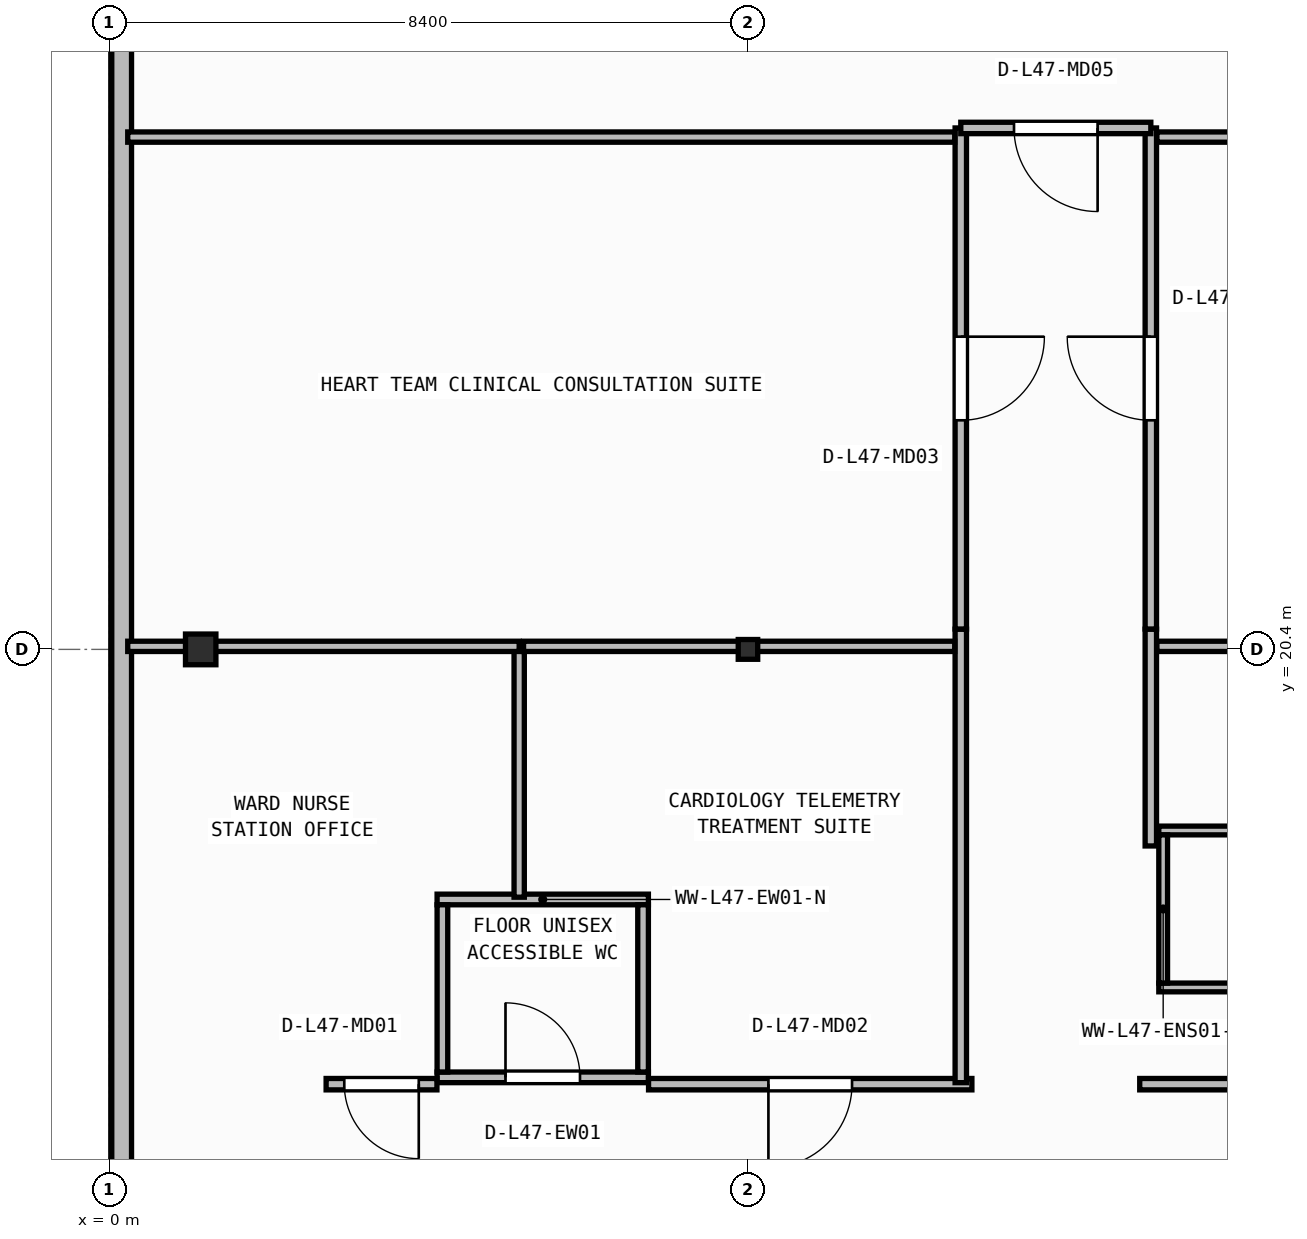
"""IFC4 building model, lengths in metres.
Left out: names, types, materials, properties, quantities, classifications, styles, units other than length and angle.
Written with IfcOpenShell. Run it as: python <this file> out.ifc"""

import sys

from ifc_helpers import new_model, si_unit, direction, frame, frame_2d, origin, origin_2d, place, context, subcontext, project, spatial, rectangle, i_section, extrude, element, fill, save


model = new_model("IFC4")
c1 = context("Model", 3, precision=1e-05, world=origin(), true_north=direction((0.0, 1.0)))
c2 = subcontext(c1, "Body", "Model", "MODEL_VIEW")
j1 = project(units=[si_unit("LENGTHUNIT", "METRE"), si_unit("PLANEANGLEUNIT", "RADIAN")], contexts=[c1])
p1 = place(None, origin())
s1 = spatial("IfcSite", under=j1, at=p1, CompositionType="ELEMENT")
p2 = place(p1, origin())
s2 = spatial("IfcBuilding", under=s1, at=p2, CompositionType="ELEMENT")
p3 = place(p2, frame((0.0, 0.0, 192.1)))
s3 = spatial("IfcBuildingStorey", under=s2, at=p3, CompositionType="ELEMENT", Elevation=192.1)
p4 = place(p3, frame((1.2, 20.4, 0.0), z_axis=(0.0, 0.0, 1.0), x_axis=(1.0, 0.0, 0.0)))
e1 = element("IfcColumn", 1, at=p4, inside=s3, PredefinedType="COLUMN", context=c2, shape_type="SweptSolid", body=[
    extrude(i_section(OverallWidth=0.4, OverallDepth=0.404, WebThickness=0.02, FlangeThickness=0.032, at=origin_2d()), origin(), (0.0, 0.0, 1.0), 3.95),
])
p5 = place(p3, frame((8.4, 20.4, 0.0), z_axis=(0.0, 0.0, 1.0), x_axis=(1.0, 0.0, 0.0)))
e2 = element("IfcColumn", 2, at=p5, inside=s3, PredefinedType="COLUMN", context=c2, shape_type="SweptSolid", body=[
    extrude(i_section(OverallWidth=0.256, OverallDepth=0.26, WebThickness=0.01, FlangeThickness=0.017, FilletRadius=0.013, at=origin_2d()), origin(), (0.0, 0.0, 1.0), 3.95),
])
p6 = place(p3, frame((0.16, 40.14, 0.0), z_axis=(0.0, 0.0, 1.0), x_axis=(0.0, -1.0, 0.0)))
e3 = element("IfcWall", 3, at=p6, inside=s3, PredefinedType="STANDARD", context=c2, shape_type="SweptSolid", body=[
    extrude(rectangle(XDim=37.48, YDim=0.26, at=frame_2d((18.74, 0.0))), origin(), (0.0, 0.0, 1.0), 3.71),
])
p7 = place(p6, frame((27.4, 0.0, 0.9)))
e4 = element("IfcOpeningElement", 4, at=p7, cuts=e3, PredefinedType="OPENING", context=c2, shape_type="SweptSolid", body=[
    extrude(rectangle(XDim=2.4, YDim=1.65, at=frame_2d((1.2, 0.825))), frame((0.0, 0.14, 0.0), z_axis=(0.0, -1.0, 0.0), x_axis=(1.0, 0.0, 0.0)), (0.0, 0.0, 1.0), 0.28),
])
p8 = place(p3, frame((4.31, 14.77, 0.0), z_axis=(0.0, 0.0, 1.0), x_axis=(1.0, 0.0, 0.0)))
e5 = element("IfcWall", 5, at=p8, inside=s3, PredefinedType="PARTITIONING", context=c2, shape_type="SweptSolid", body=[
    extrude(rectangle(XDim=2.78, YDim=0.14, at=frame_2d((1.39, 0.0))), origin(), (0.0, 0.0, 1.0), 3.71),
])
p9 = place(p8, frame((0.9, 0.0, 0.0)))
e6 = element("IfcOpeningElement", 6, at=p9, cuts=e5, PredefinedType="OPENING", context=c2, shape_type="SweptSolid", body=[
    extrude(rectangle(XDim=0.98, YDim=2.1, at=frame_2d((0.49, 1.05))), frame((0.0, 0.08, 0.0), z_axis=(0.0, -1.0, 0.0), x_axis=(1.0, 0.0, 0.0)), (0.0, 0.0, 1.0), 0.16),
])
p10 = place(p3, frame((4.31, 17.11, 0.0), z_axis=(0.0, 0.0, 1.0), x_axis=(1.0, 0.0, 0.0)))
e7 = element("IfcWall", 7, at=p10, inside=s3, PredefinedType="PARTITIONING", context=c2, shape_type="SweptSolid", body=[
    extrude(rectangle(XDim=2.78, YDim=0.14, at=frame_2d((1.39, 0.0))), origin(), (0.0, 0.0, 1.0), 3.71),
])
for number, where, z_axis, x_axis in (
    (8, (4.38, 14.84, 0.0), (0.0, 0.0, 1.0), (0.0, 1.0, 0.0)),
    (9, (7.02, 14.84, 0.0), (0.0, 0.0, 1.0), (0.0, 1.0, 0.0)),
):
    element("IfcWall", number, at=place(p3, frame(where, z_axis=z_axis, x_axis=x_axis)), inside=s3, PredefinedType="PARTITIONING", context=c2, shape_type="SweptSolid", body=[
        extrude(rectangle(XDim=2.2, YDim=0.14, at=frame_2d((1.1, 0.0))), origin(), (0.0, 0.0, 1.0), 3.71),
    ])
for number, where, z_axis, x_axis in (
    (10, (13.805, 15.952, 0.0), (0.0, 0.0, 1.0), (1.0, 0.0, 0.0)),
    (11, (13.805, 18.018, 0.0), (0.0, 0.0, 1.0), (1.0, 0.0, 0.0)),
):
    element("IfcWall", number, at=place(p3, frame(where, z_axis=z_axis, x_axis=x_axis)), inside=s3, PredefinedType="PARTITIONING", context=c2, shape_type="SweptSolid", body=[
        extrude(rectangle(XDim=2.15, YDim=0.115, at=frame_2d((1.075, 0.0))), origin(), (0.0, 0.0, 1.0), 3.71),
    ])
p11 = place(p3, frame((13.863, 16.01, 0.0), z_axis=(0.0, 0.0, 1.0), x_axis=(0.0, 1.0, 0.0)))
e12 = element("IfcWall", 12, at=p11, inside=s3, PredefinedType="PARTITIONING", context=c2, shape_type="SweptSolid", body=[
    extrude(rectangle(XDim=1.95, YDim=0.115, at=frame_2d((0.975, 0.0))), origin(), (0.0, 0.0, 1.0), 3.71),
])
p12 = place(p3, frame((4.308, 14.68, 0.0), z_axis=(0.0, 0.0, 1.0), x_axis=(-1.0, 0.0, 0.0)))
e13 = element("IfcWall", 13, at=p12, inside=s3, PredefinedType="PARTITIONING", context=c2, shape_type="SweptSolid", body=[
    extrude(rectangle(XDim=1.458, YDim=0.15, at=frame_2d((0.729, 0.0))), origin(), (0.0, 0.0, 1.0), 3.71),
])
p13 = place(p12, frame((0.239, 0.0, 0.0)))
e14 = element("IfcOpeningElement", 14, at=p13, cuts=e13, PredefinedType="OPENING", context=c2, shape_type="SweptSolid", body=[
    extrude(rectangle(XDim=0.98, YDim=2.1, at=frame_2d((0.49, 1.05))), frame((0.0, 0.085, 0.0), z_axis=(0.0, -1.0, 0.0), x_axis=(1.0, 0.0, 0.0)), (0.0, 0.0, 1.0), 0.17),
])
p14 = place(p3, frame((11.346, 14.68, 0.0), z_axis=(0.0, 0.0, 1.0), x_axis=(-1.0, 0.0, 0.0)))
e15 = element("IfcWall", 15, at=p14, inside=s3, PredefinedType="PARTITIONING", context=c2, shape_type="SweptSolid", body=[
    extrude(rectangle(XDim=4.254, YDim=0.15, at=frame_2d((2.127, 0.0))), origin(), (0.0, 0.0, 1.0), 3.71),
])
p15 = place(p14, frame((1.577, 0.0, 0.0)))
e16 = element("IfcOpeningElement", 16, at=p15, cuts=e15, PredefinedType="OPENING", context=c2, shape_type="SweptSolid", body=[
    extrude(rectangle(XDim=1.1, YDim=2.1, at=frame_2d((0.55, 1.05))), frame((0.0, 0.085, 0.0), z_axis=(0.0, -1.0, 0.0), x_axis=(1.0, 0.0, 0.0)), (0.0, 0.0, 1.0), 0.17),
])
p16 = place(p3, frame((18.966, 14.68, 0.0), z_axis=(0.0, 0.0, 1.0), x_axis=(-1.0, 0.0, 0.0)))
e17 = element("IfcWall", 17, at=p16, inside=s3, PredefinedType="PARTITIONING", context=c2, shape_type="SweptSolid", body=[
    extrude(rectangle(XDim=5.412, YDim=0.15, at=frame_2d((2.706, 0.0))), origin(), (0.0, 0.0, 1.0), 3.71),
])
p17 = place(p16, frame((2.056, 0.0, 0.0)))
e18 = element("IfcOpeningElement", 18, at=p17, cuts=e17, PredefinedType="OPENING", context=c2, shape_type="SweptSolid", body=[
    extrude(rectangle(XDim=1.3, YDim=2.15, at=frame_2d((0.65, 1.075))), frame((0.0, 0.085, 0.0), z_axis=(0.0, -1.0, 0.0), x_axis=(1.0, 0.0, 0.0)), (0.0, 0.0, 1.0), 0.17),
])
p18 = place(p3, frame((11.2, 20.666, 0.0), z_axis=(0.0, 0.0, 1.0), x_axis=(0.0, -1.0, 0.0)))
e19 = element("IfcWall", 19, at=p18, inside=s3, PredefinedType="PARTITIONING", context=c2, shape_type="SweptSolid", body=[
    extrude(rectangle(XDim=5.966, YDim=0.15, at=frame_2d((2.983, 0.0))), origin(), (0.0, 0.0, 1.0), 3.71),
])
p19 = place(p3, frame((13.7, 17.814, 0.0), z_axis=(0.0, 0.0, 1.0), x_axis=(0.0, 1.0, 0.0)))
e20 = element("IfcWall", 20, at=p19, inside=s3, PredefinedType="PARTITIONING", context=c2, shape_type="SweptSolid", body=[
    extrude(rectangle(XDim=2.852, YDim=0.15, at=frame_2d((1.426, 0.0))), origin(), (0.0, 0.0, 1.0), 3.71),
])
p20 = place(p3, frame((11.2, 27.26, 0.0), z_axis=(0.0, 0.0, 1.0), x_axis=(0.0, -1.0, 0.0)))
e21 = element("IfcWall", 21, at=p20, inside=s3, PredefinedType="PARTITIONING", context=c2, shape_type="SweptSolid", body=[
    extrude(rectangle(XDim=6.592, YDim=0.15, at=frame_2d((3.296, 0.0))), origin(), (0.0, 0.0, 1.0), 3.71),
])
p21 = place(p20, frame((2.746, 0.0, 0.0)))
e22 = element("IfcOpeningElement", 22, at=p21, cuts=e21, PredefinedType="OPENING", context=c2, shape_type="SweptSolid", body=[
    extrude(rectangle(XDim=1.1, YDim=2.1, at=frame_2d((0.55, 1.05))), frame((0.0, 0.085, 0.0), z_axis=(0.0, -1.0, 0.0), x_axis=(1.0, 0.0, 0.0)), (0.0, 0.0, 1.0), 0.17),
])
p22 = place(p3, frame((13.7, 20.668, 0.0), z_axis=(0.0, 0.0, 1.0), x_axis=(0.0, 1.0, 0.0)))
e23 = element("IfcWall", 23, at=p22, inside=s3, PredefinedType="PARTITIONING", context=c2, shape_type="SweptSolid", body=[
    extrude(rectangle(XDim=6.592, YDim=0.15, at=frame_2d((3.296, 0.0))), origin(), (0.0, 0.0, 1.0), 3.71),
])
p23 = place(p22, frame((2.746, 0.0, 0.0)))
e24 = element("IfcOpeningElement", 24, at=p23, cuts=e23, PredefinedType="OPENING", context=c2, shape_type="SweptSolid", body=[
    extrude(rectangle(XDim=1.1, YDim=2.1, at=frame_2d((0.55, 1.05))), frame((0.0, 0.085, 0.0), z_axis=(0.0, -1.0, 0.0), x_axis=(1.0, 0.0, 0.0)), (0.0, 0.0, 1.0), 0.17),
])
p24 = place(p3, frame((13.7, 27.26, 0.0), z_axis=(0.0, 0.0, 1.0), x_axis=(-1.0, 0.0, 0.0)))
e25 = element("IfcWall", 25, at=p24, inside=s3, PredefinedType="PARTITIONING", context=c2, shape_type="SweptSolid", body=[
    extrude(rectangle(XDim=2.5, YDim=0.15, at=frame_2d((1.25, 0.0))), origin(), (0.0, 0.0, 1.0), 3.71),
])
p25 = place(p24, frame((0.7, 0.0, 0.0)))
e26 = element("IfcOpeningElement", 26, at=p25, cuts=e25, PredefinedType="OPENING", context=c2, shape_type="SweptSolid", body=[
    extrude(rectangle(XDim=1.1, YDim=2.1, at=frame_2d((0.55, 1.05))), frame((0.0, 0.085, 0.0), z_axis=(0.0, -1.0, 0.0), x_axis=(1.0, 0.0, 0.0)), (0.0, 0.0, 1.0), 0.17),
])
p26 = place(p3, frame((5.39, 17.14, 0.0), z_axis=(0.0, 0.0, 1.0), x_axis=(0.0, 1.0, 0.0)))
e27 = element("IfcWall", 27, at=p26, inside=s3, PredefinedType="PARTITIONING", context=c2, shape_type="SweptSolid", body=[
    extrude(rectangle(XDim=3.3, YDim=0.135, at=frame_2d((1.65, 0.0))), origin(), (0.0, 0.0, 1.0), 3.71),
])
p27 = place(p3, frame((5.39, 20.44, 0.0), z_axis=(0.0, 0.0, 1.0), x_axis=(-1.0, 0.0, 0.0)))
e28 = element("IfcWall", 28, at=p27, inside=s3, PredefinedType="PARTITIONING", context=c2, shape_type="SweptSolid", body=[
    extrude(rectangle(XDim=5.15, YDim=0.135, at=frame_2d((2.575, 0.0))), origin(), (0.0, 0.0, 1.0), 3.152),
])
p28 = place(p3, frame((11.12, 20.44, 0.0), z_axis=(0.0, 0.0, 1.0), x_axis=(-1.0, 0.0, 0.0)))
e29 = element("IfcWall", 29, at=p28, inside=s3, PredefinedType="PARTITIONING", context=c2, shape_type="SweptSolid", body=[
    extrude(rectangle(XDim=5.673, YDim=0.135, at=frame_2d((2.836, 0.0))), origin(), (0.0, 0.0, 1.0), 3.152),
])
p29 = place(p3, frame((18.74, 20.44, 0.0), z_axis=(0.0, 0.0, 1.0), x_axis=(-1.0, 0.0, 0.0)))
e30 = element("IfcWall", 30, at=p29, inside=s3, PredefinedType="PARTITIONING", context=c2, shape_type="SweptSolid", body=[
    extrude(rectangle(XDim=4.96, YDim=0.135, at=frame_2d((2.48, 0.0))), origin(), (0.0, 0.0, 1.0), 3.152),
])
p30 = place(p3, frame((11.12, 27.14, 0.0), z_axis=(0.0, 0.0, 1.0), x_axis=(-1.0, 0.0, 0.0)))
e31 = element("IfcWall", 31, at=p30, inside=s3, PredefinedType="PARTITIONING", context=c2, shape_type="SweptSolid", body=[
    extrude(rectangle(XDim=10.88, YDim=0.135, at=frame_2d((5.44, 0.0))), origin(), (0.0, 0.0, 1.0), 3.71),
])
p31 = place(p3, frame((16.518, 27.14, 0.0), z_axis=(0.0, 0.0, 1.0), x_axis=(-1.0, 0.0, 0.0)))
e32 = element("IfcWall", 32, at=p31, inside=s3, PredefinedType="PARTITIONING", context=c2, shape_type="SweptSolid", body=[
    extrude(rectangle(XDim=2.738, YDim=0.135, at=frame_2d((1.369, 0.0))), origin(), (0.0, 0.0, 1.0), 3.71),
])
p32 = place(p9, origin())
e33 = element("IfcDoor", 33, at=p32, inside=s3, OperationType="SINGLE_SWING_LEFT", PredefinedType="DOOR", context=c2, shape_type="SweptSolid", body=[
    extrude(rectangle(XDim=0.98, YDim=2.1, at=frame_2d((0.49, 1.05))), frame((0.0, 0.025, 0.0), z_axis=(0.0, -1.0, 0.0), x_axis=(1.0, 0.0, 0.0)), (0.0, 0.0, 1.0), 0.05),
])
fill(e6, e33)
p33 = place(p13, origin())
e34 = element("IfcDoor", 34, at=p33, inside=s3, OperationType="SINGLE_SWING_LEFT", PredefinedType="DOOR", context=c2, shape_type="SweptSolid", body=[
    extrude(rectangle(XDim=0.98, YDim=2.1, at=frame_2d((0.49, 1.05))), frame((0.0, 0.025, 0.0), z_axis=(0.0, -1.0, 0.0), x_axis=(1.0, 0.0, 0.0)), (0.0, 0.0, 1.0), 0.05),
])
fill(e14, e34)
p34 = place(p15, origin())
e35 = element("IfcDoor", 35, at=p34, inside=s3, OperationType="SINGLE_SWING_RIGHT", PredefinedType="DOOR", context=c2, shape_type="SweptSolid", body=[
    extrude(rectangle(XDim=1.1, YDim=2.1, at=frame_2d((0.55, 1.05))), frame((0.0, 0.025, 0.0), z_axis=(0.0, -1.0, 0.0), x_axis=(1.0, 0.0, 0.0)), (0.0, 0.0, 1.0), 0.05),
])
fill(e16, e35)
p35 = place(p21, origin())
e36 = element("IfcDoor", 36, at=p35, inside=s3, OperationType="SINGLE_SWING_LEFT", PredefinedType="DOOR", context=c2, shape_type="SweptSolid", body=[
    extrude(rectangle(XDim=1.1, YDim=2.1, at=frame_2d((0.55, 1.05))), frame((0.0, 0.025, 0.0), z_axis=(0.0, -1.0, 0.0), x_axis=(1.0, 0.0, 0.0)), (0.0, 0.0, 1.0), 0.05),
])
fill(e22, e36)
p36 = place(p23, origin())
e37 = element("IfcDoor", 37, at=p36, inside=s3, OperationType="SINGLE_SWING_RIGHT", PredefinedType="DOOR", context=c2, shape_type="SweptSolid", body=[
    extrude(rectangle(XDim=1.1, YDim=2.1, at=frame_2d((0.55, 1.05))), frame((0.0, 0.025, 0.0), z_axis=(0.0, -1.0, 0.0), x_axis=(1.0, 0.0, 0.0)), (0.0, 0.0, 1.0), 0.05),
])
fill(e24, e37)
p37 = place(p25, origin())
e38 = element("IfcDoor", 38, at=p37, inside=s3, OperationType="SINGLE_SWING_LEFT", PredefinedType="DOOR", context=c2, shape_type="SweptSolid", body=[
    extrude(rectangle(XDim=1.1, YDim=2.1, at=frame_2d((0.55, 1.05))), frame((0.0, 0.025, 0.0), z_axis=(0.0, -1.0, 0.0), x_axis=(1.0, 0.0, 0.0)), (0.0, 0.0, 1.0), 0.05),
])
fill(e26, e38)
save(model, sys.argv[1])
